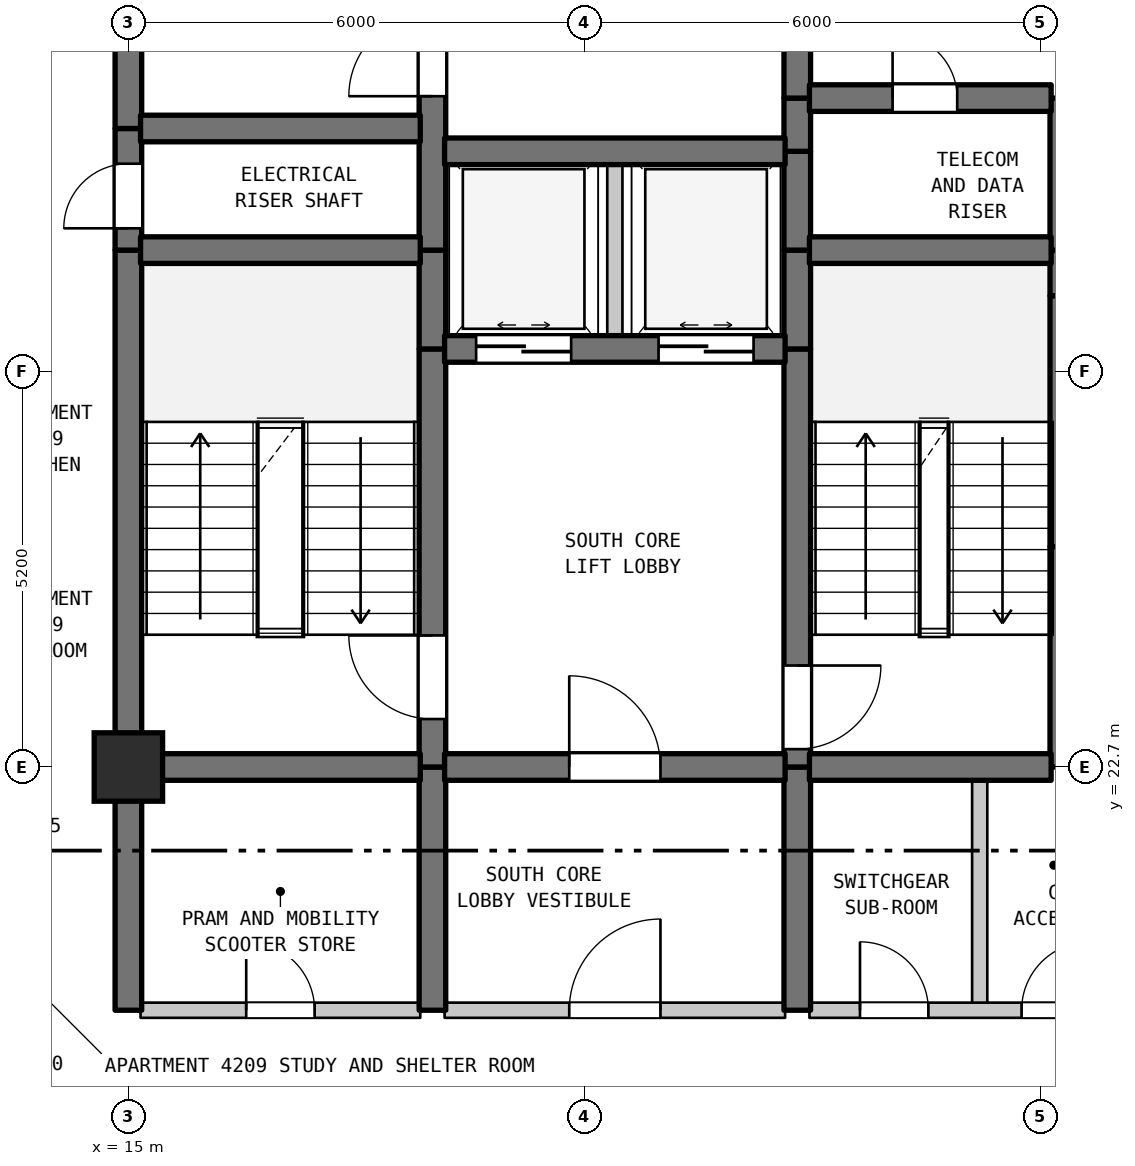
"""IFC4 building model, lengths in metres.
Left out: names, types, materials, properties, quantities, classifications, styles, units other than length and angle.
Written with IfcOpenShell. Run it as: python <this file> out.ifc"""

import sys

from ifc_helpers import new_model, si_unit, direction, frame, frame_2d, origin, origin_2d, place, context, subcontext, project, spatial, rectangle, extrude, element, fill, save


model = new_model("IFC4")
c1 = context("Model", 3, precision=1e-05, world=origin(), true_north=direction((0.0, 1.0)))
c2 = subcontext(c1, "Body", "Model", "MODEL_VIEW")
j1 = project(units=[si_unit("LENGTHUNIT", "METRE"), si_unit("PLANEANGLEUNIT", "RADIAN")], contexts=[c1])
p1 = place(None, origin())
s1 = spatial("IfcSite", under=j1, at=p1, CompositionType="ELEMENT")
p2 = place(p1, origin())
s2 = spatial("IfcBuilding", under=s1, at=p2, CompositionType="ELEMENT")
p3 = place(p2, frame((0.0, 0.0, 172.8)))
s3 = spatial("IfcBuildingStorey", under=s2, at=p3, CompositionType="ELEMENT", Elevation=172.8)
p4 = place(p3, frame((15.0, 22.7, 0.0), z_axis=(0.0, 0.0, 1.0), x_axis=(1.0, 0.0, 0.0)))
e1 = element("IfcColumn", 1, at=p4, inside=s3, PredefinedType="COLUMN", context=c2, shape_type="SweptSolid", body=[
    extrude(rectangle(XDim=0.9, YDim=0.9, at=origin_2d()), origin(), (0.0, 0.0, 1.0), 3.7),
])
p5 = place(p3, frame((15.0, 19.5, 0.0), z_axis=(0.0, 0.0, 1.0), x_axis=(0.0, 1.0, 0.0)))
e2 = element("IfcWall", 2, at=p5, inside=s3, PredefinedType="SHEAR", context=c2, shape_type="SweptSolid", body=[
    extrude(rectangle(XDim=3.2, YDim=0.35, at=frame_2d((1.6, 0.0))), origin(), (0.0, 0.0, 1.0), 3.39),
])
p6 = place(p3, frame((15.0, 22.7, 0.0), z_axis=(0.0, 0.0, 1.0), x_axis=(0.0, 1.0, 0.0)))
e3 = element("IfcWall", 3, at=p6, inside=s3, PredefinedType="SHEAR", context=c2, shape_type="SweptSolid", body=[
    extrude(rectangle(XDim=6.8, YDim=0.35, at=frame_2d((3.4, 0.0))), origin(), (0.0, 0.0, 1.0), 3.39),
])
p7 = place(p3, frame((15.0, 29.5, 0.0), z_axis=(0.0, 0.0, 1.0), x_axis=(0.0, 1.0, 0.0)))
e4 = element("IfcWall", 4, at=p7, inside=s3, PredefinedType="SHEAR", context=c2, shape_type="SweptSolid", body=[
    extrude(rectangle(XDim=1.6, YDim=0.35, at=frame_2d((0.8, 0.0))), origin(), (0.0, 0.0, 1.0), 3.39),
])
p8 = place(p7, frame((0.287, 0.0, 0.0)))
e5 = element("IfcOpeningElement", 5, at=p8, cuts=e4, PredefinedType="OPENING", context=c2, shape_type="SweptSolid", body=[
    extrude(rectangle(XDim=0.85, YDim=2.1, at=frame_2d((0.425, 1.05))), frame((0.0, 0.185, 0.0), z_axis=(0.0, -1.0, 0.0), x_axis=(1.0, 0.0, 0.0)), (0.0, 0.0, 1.0), 0.37),
])
p9 = place(p3, frame((15.0, 31.1, 0.0), z_axis=(0.0, 0.0, 1.0), x_axis=(0.0, 1.0, 0.0)))
e6 = element("IfcWall", 6, at=p9, inside=s3, PredefinedType="SHEAR", context=c2, shape_type="SweptSolid", body=[
    extrude(rectangle(XDim=6.8, YDim=0.35, at=frame_2d((3.4, 0.0))), origin(), (0.0, 0.0, 1.0), 3.39),
])
p10 = place(p3, frame((19.0, 19.5, 0.0), z_axis=(0.0, 0.0, 1.0), x_axis=(0.0, 1.0, 0.0)))
e7 = element("IfcWall", 7, at=p10, inside=s3, PredefinedType="SHEAR", context=c2, shape_type="SweptSolid", body=[
    extrude(rectangle(XDim=3.2, YDim=0.35, at=frame_2d((1.6, 0.0))), origin(), (0.0, 0.0, 1.0), 3.39),
])
p11 = place(p3, frame((19.0, 22.7, 0.0), z_axis=(0.0, 0.0, 1.0), x_axis=(0.0, 1.0, 0.0)))
e8 = element("IfcWall", 8, at=p11, inside=s3, PredefinedType="SHEAR", context=c2, shape_type="SweptSolid", body=[
    extrude(rectangle(XDim=5.5, YDim=0.35, at=frame_2d((2.75, 0.0))), origin(), (0.0, 0.0, 1.0), 3.39),
])
p12 = place(p11, frame((0.631, 0.0, 0.0)))
e9 = element("IfcOpeningElement", 9, at=p12, cuts=e8, PredefinedType="OPENING", context=c2, shape_type="SweptSolid", body=[
    extrude(rectangle(XDim=1.1, YDim=2.15, at=frame_2d((0.55, 1.075))), frame((0.0, 0.185, 0.0), z_axis=(0.0, -1.0, 0.0), x_axis=(1.0, 0.0, 0.0)), (0.0, 0.0, 1.0), 0.37),
])
p13 = place(p3, frame((19.0, 28.2, 0.0), z_axis=(0.0, 0.0, 1.0), x_axis=(0.0, 1.0, 0.0)))
e10 = element("IfcWall", 10, at=p13, inside=s3, PredefinedType="SHEAR", context=c2, shape_type="SweptSolid", body=[
    extrude(rectangle(XDim=1.3, YDim=0.35, at=frame_2d((0.65, 0.0))), origin(), (0.0, 0.0, 1.0), 3.39),
])
p14 = place(p3, frame((19.0, 29.5, 0.0), z_axis=(0.0, 0.0, 1.0), x_axis=(0.0, 1.0, 0.0)))
e11 = element("IfcWall", 11, at=p14, inside=s3, PredefinedType="SHEAR", context=c2, shape_type="SweptSolid", body=[
    extrude(rectangle(XDim=5.5, YDim=0.35, at=frame_2d((2.75, 0.0))), origin(), (0.0, 0.0, 1.0), 3.39),
])
p15 = place(p14, frame((2.025, 0.0, 0.0)))
e12 = element("IfcOpeningElement", 12, at=p15, cuts=e11, PredefinedType="OPENING", context=c2, shape_type="SweptSolid", body=[
    extrude(rectangle(XDim=1.1, YDim=2.15, at=frame_2d((0.55, 1.075))), frame((0.0, 0.185, 0.0), z_axis=(0.0, -1.0, 0.0), x_axis=(1.0, 0.0, 0.0)), (0.0, 0.0, 1.0), 0.37),
])
p16 = place(p3, frame((21.4, 28.2, 0.0), z_axis=(0.0, 0.0, 1.0), x_axis=(0.0, 1.0, 0.0)))
e13 = element("IfcWall", 13, at=p16, inside=s3, PredefinedType="STANDARD", context=c2, shape_type="SweptSolid", body=[
    extrude(rectangle(XDim=2.6, YDim=0.2, at=frame_2d((1.3, 0.0))), origin(), (0.0, 0.0, 1.0), 3.39),
])
p17 = place(p3, frame((23.8, 19.5, 0.0), z_axis=(0.0, 0.0, 1.0), x_axis=(0.0, 1.0, 0.0)))
e14 = element("IfcWall", 14, at=p17, inside=s3, PredefinedType="SHEAR", context=c2, shape_type="SweptSolid", body=[
    extrude(rectangle(XDim=3.2, YDim=0.35, at=frame_2d((1.6, 0.0))), origin(), (0.0, 0.0, 1.0), 3.39),
])
p18 = place(p3, frame((23.8, 22.7, 0.0), z_axis=(0.0, 0.0, 1.0), x_axis=(0.0, 1.0, 0.0)))
e15 = element("IfcWall", 15, at=p18, inside=s3, PredefinedType="SHEAR", context=c2, shape_type="SweptSolid", body=[
    extrude(rectangle(XDim=5.5, YDim=0.35, at=frame_2d((2.75, 0.0))), origin(), (0.0, 0.0, 1.0), 3.39),
])
p19 = place(p18, frame((0.235, 0.0, 0.0)))
e16 = element("IfcOpeningElement", 16, at=p19, cuts=e15, PredefinedType="OPENING", context=c2, shape_type="SweptSolid", body=[
    extrude(rectangle(XDim=1.1, YDim=2.15, at=frame_2d((0.55, 1.075))), frame((0.0, 0.185, 0.0), z_axis=(0.0, -1.0, 0.0), x_axis=(1.0, 0.0, 0.0)), (0.0, 0.0, 1.0), 0.37),
])
for number, where, z_axis, x_axis in (
    (17, (23.8, 28.2, 0.0), (0.0, 0.0, 1.0), (0.0, 1.0, 0.0)),
    (18, (23.8, 29.5, 0.0), (0.0, 0.0, 1.0), (0.0, 1.0, 0.0)),
):
    element("IfcWall", number, at=place(p3, frame(where, z_axis=z_axis, x_axis=x_axis)), inside=s3, PredefinedType="SHEAR", context=c2, shape_type="SweptSolid", body=[
        extrude(rectangle(XDim=1.3, YDim=0.35, at=frame_2d((0.65, 0.0))), origin(), (0.0, 0.0, 1.0), 3.39),
    ])
p20 = place(p3, frame((23.8, 30.8, 0.0), z_axis=(0.0, 0.0, 1.0), x_axis=(0.0, 1.0, 0.0)))
e19 = element("IfcWall", 19, at=p20, inside=s3, PredefinedType="SHEAR", context=c2, shape_type="SweptSolid", body=[
    extrude(rectangle(XDim=0.7, YDim=0.35, at=frame_2d((0.35, 0.0))), origin(), (0.0, 0.0, 1.0), 3.39),
])
p21 = place(p3, frame((23.8, 31.5, 0.0), z_axis=(0.0, 0.0, 1.0), x_axis=(0.0, 1.0, 0.0)))
e20 = element("IfcWall", 20, at=p21, inside=s3, PredefinedType="SHEAR", context=c2, shape_type="SweptSolid", body=[
    extrude(rectangle(XDim=3.5, YDim=0.35, at=frame_2d((1.75, 0.0))), origin(), (0.0, 0.0, 1.0), 3.39),
])
p22 = place(p21, frame((1.127, 0.0, 0.0)))
e21 = element("IfcOpeningElement", 21, at=p22, cuts=e20, PredefinedType="OPENING", context=c2, shape_type="SweptSolid", body=[
    extrude(rectangle(XDim=1.1, YDim=2.15, at=frame_2d((0.55, 1.075))), frame((0.0, 0.185, 0.0), z_axis=(0.0, -1.0, 0.0), x_axis=(1.0, 0.0, 0.0)), (0.0, 0.0, 1.0), 0.37),
])
p23 = place(p3, frame((26.2, 19.5, 0.0), z_axis=(0.0, 0.0, 1.0), x_axis=(0.0, 1.0, 0.0)))
e22 = element("IfcWall", 22, at=p23, inside=s3, PredefinedType="STANDARD", context=c2, shape_type="SweptSolid", body=[
    extrude(rectangle(XDim=3.2, YDim=0.2, at=frame_2d((1.6, 0.0))), origin(), (0.0, 0.0, 1.0), 3.39),
])
p24 = place(p3, frame((27.3, 22.7, 0.0), z_axis=(0.0, 0.0, 1.0), x_axis=(0.0, 1.0, 0.0)))
e23 = element("IfcWall", 23, at=p24, inside=s3, PredefinedType="SHEAR", context=c2, shape_type="SweptSolid", body=[
    extrude(rectangle(XDim=2.9, YDim=0.35, at=frame_2d((1.45, 0.0))), origin(), (0.0, 0.0, 1.0), 3.39),
])
p25 = place(p3, frame((27.3, 25.6, 0.0), z_axis=(0.0, 0.0, 1.0), x_axis=(0.0, 1.0, 0.0)))
e24 = element("IfcWall", 24, at=p25, inside=s3, PredefinedType="SHEAR", context=c2, shape_type="SweptSolid", body=[
    extrude(rectangle(XDim=3.3, YDim=0.35, at=frame_2d((1.65, 0.0))), origin(), (0.0, 0.0, 1.0), 3.39),
])
p26 = place(p3, frame((27.3, 28.9, 0.0), z_axis=(0.0, 0.0, 1.0), x_axis=(0.0, 1.0, 0.0)))
e25 = element("IfcWall", 25, at=p26, inside=s3, PredefinedType="SHEAR", context=c2, shape_type="SweptSolid", body=[
    extrude(rectangle(XDim=0.6, YDim=0.35, at=frame_2d((0.3, 0.0))), origin(), (0.0, 0.0, 1.0), 3.39),
])
p27 = place(p3, frame((27.3, 29.5, 0.0), z_axis=(0.0, 0.0, 1.0), x_axis=(0.0, 1.0, 0.0)))
e26 = element("IfcWall", 26, at=p27, inside=s3, PredefinedType="SHEAR", context=c2, shape_type="SweptSolid", body=[
    extrude(rectangle(XDim=2.0, YDim=0.35, at=frame_2d((1.0, 0.0))), origin(), (0.0, 0.0, 1.0), 3.39),
])
p28 = place(p3, frame((15.16, 19.5, 0.0), z_axis=(0.0, 0.0, 1.0), x_axis=(1.0, 0.0, 0.0)))
e27 = element("IfcWall", 27, at=p28, inside=s3, PredefinedType="STANDARD", context=c2, shape_type="SweptSolid", body=[
    extrude(rectangle(XDim=3.68, YDim=0.2, at=frame_2d((1.84, 0.0))), origin(), (0.0, 0.0, 1.0), 3.39),
])
p29 = place(p28, frame((1.39, 0.0, 0.0)))
e28 = element("IfcOpeningElement", 28, at=p29, cuts=e27, PredefinedType="OPENING", context=c2, shape_type="SweptSolid", body=[
    extrude(rectangle(XDim=0.9, YDim=2.15, at=frame_2d((0.45, 1.075))), frame((0.0, 0.11, 0.0), z_axis=(0.0, -1.0, 0.0), x_axis=(1.0, 0.0, 0.0)), (0.0, 0.0, 1.0), 0.22),
])
p30 = place(p3, frame((19.16, 19.5, 0.0), z_axis=(0.0, 0.0, 1.0), x_axis=(1.0, 0.0, 0.0)))
e29 = element("IfcWall", 29, at=p30, inside=s3, PredefinedType="STANDARD", context=c2, shape_type="SweptSolid", body=[
    extrude(rectangle(XDim=4.48, YDim=0.2, at=frame_2d((2.24, 0.0))), origin(), (0.0, 0.0, 1.0), 3.39),
])
p31 = place(p30, frame((1.64, 0.0, 0.0)))
e30 = element("IfcOpeningElement", 30, at=p31, cuts=e29, PredefinedType="OPENING", context=c2, shape_type="SweptSolid", body=[
    extrude(rectangle(XDim=1.2, YDim=2.2, at=frame_2d((0.6, 1.1))), frame((0.0, 0.11, 0.0), z_axis=(0.0, -1.0, 0.0), x_axis=(1.0, 0.0, 0.0)), (0.0, 0.0, 1.0), 0.22),
])
p32 = place(p3, frame((23.96, 19.5, 0.0), z_axis=(0.0, 0.0, 1.0), x_axis=(1.0, 0.0, 0.0)))
e31 = element("IfcWall", 31, at=p32, inside=s3, PredefinedType="STANDARD", context=c2, shape_type="SweptSolid", body=[
    extrude(rectangle(XDim=4.455, YDim=0.2, at=frame_2d((2.228, 0.0))), origin(), (0.0, 0.0, 1.0), 3.39),
])
p33 = place(p32, frame((0.665, 0.0, 0.0)))
e32 = element("IfcOpeningElement", 32, at=p33, cuts=e31, PredefinedType="OPENING", context=c2, shape_type="SweptSolid", body=[
    extrude(rectangle(XDim=0.9, YDim=2.15, at=frame_2d((0.45, 1.075))), frame((0.0, 0.11, 0.0), z_axis=(0.0, -1.0, 0.0), x_axis=(1.0, 0.0, 0.0)), (0.0, 0.0, 1.0), 0.22),
])
p34 = place(p32, frame((2.791, 0.0, 0.0)))
e33 = element("IfcOpeningElement", 33, at=p34, cuts=e31, PredefinedType="OPENING", context=c2, shape_type="SweptSolid", body=[
    extrude(rectangle(XDim=0.9, YDim=2.15, at=frame_2d((0.45, 1.075))), frame((0.0, 0.11, 0.0), z_axis=(0.0, -1.0, 0.0), x_axis=(1.0, 0.0, 0.0)), (0.0, 0.0, 1.0), 0.22),
])
p35 = place(p3, frame((15.16, 22.7, 0.0), z_axis=(0.0, 0.0, 1.0), x_axis=(1.0, 0.0, 0.0)))
e34 = element("IfcWall", 34, at=p35, inside=s3, PredefinedType="SHEAR", context=c2, shape_type="SweptSolid", body=[
    extrude(rectangle(XDim=3.68, YDim=0.35, at=frame_2d((1.84, 0.0))), origin(), (0.0, 0.0, 1.0), 3.39),
])
p36 = place(p3, frame((19.16, 22.7, 0.0), z_axis=(0.0, 0.0, 1.0), x_axis=(1.0, 0.0, 0.0)))
e35 = element("IfcWall", 35, at=p36, inside=s3, PredefinedType="SHEAR", context=c2, shape_type="SweptSolid", body=[
    extrude(rectangle(XDim=4.48, YDim=0.35, at=frame_2d((2.24, 0.0))), origin(), (0.0, 0.0, 1.0), 3.39),
])
p37 = place(p36, frame((1.64, 0.0, 0.0)))
e36 = element("IfcOpeningElement", 36, at=p37, cuts=e35, PredefinedType="OPENING", context=c2, shape_type="SweptSolid", body=[
    extrude(rectangle(XDim=1.2, YDim=2.2, at=frame_2d((0.6, 1.1))), frame((0.0, 0.185, 0.0), z_axis=(0.0, -1.0, 0.0), x_axis=(1.0, 0.0, 0.0)), (0.0, 0.0, 1.0), 0.37),
])
p38 = place(p3, frame((23.96, 22.7, 0.0), z_axis=(0.0, 0.0, 1.0), x_axis=(1.0, 0.0, 0.0)))
e37 = element("IfcWall", 37, at=p38, inside=s3, PredefinedType="SHEAR", context=c2, shape_type="SweptSolid", body=[
    extrude(rectangle(XDim=3.18, YDim=0.35, at=frame_2d((1.59, 0.0))), origin(), (0.0, 0.0, 1.0), 3.39),
])
p39 = place(p3, frame((19.16, 28.2, 0.0), z_axis=(0.0, 0.0, 1.0), x_axis=(1.0, 0.0, 0.0)))
e38 = element("IfcWall", 38, at=p39, inside=s3, PredefinedType="SHEAR", context=c2, shape_type="SweptSolid", body=[
    extrude(rectangle(XDim=4.48, YDim=0.35, at=frame_2d((2.24, 0.0))), origin(), (0.0, 0.0, 1.0), 3.39),
])
p40 = place(p39, frame((0.415, 0.0, 0.0)))
e39 = element("IfcOpeningElement", 39, at=p40, cuts=e38, PredefinedType="OPENING", context=c2, shape_type="SweptSolid", body=[
    extrude(rectangle(XDim=1.25, YDim=2.2, at=frame_2d((0.625, 1.1))), frame((0.0, 0.185, 0.0), z_axis=(0.0, -1.0, 0.0), x_axis=(1.0, 0.0, 0.0)), (0.0, 0.0, 1.0), 0.37),
])
p41 = place(p39, frame((2.815, 0.0, 0.0)))
e40 = element("IfcOpeningElement", 40, at=p41, cuts=e38, PredefinedType="OPENING", context=c2, shape_type="SweptSolid", body=[
    extrude(rectangle(XDim=1.25, YDim=2.2, at=frame_2d((0.625, 1.1))), frame((0.0, 0.185, 0.0), z_axis=(0.0, -1.0, 0.0), x_axis=(1.0, 0.0, 0.0)), (0.0, 0.0, 1.0), 0.37),
])
p42 = place(p3, frame((15.16, 29.5, 0.0), z_axis=(0.0, 0.0, 1.0), x_axis=(1.0, 0.0, 0.0)))
e41 = element("IfcWall", 41, at=p42, inside=s3, PredefinedType="SHEAR", context=c2, shape_type="SweptSolid", body=[
    extrude(rectangle(XDim=3.68, YDim=0.35, at=frame_2d((1.84, 0.0))), origin(), (0.0, 0.0, 1.0), 3.39),
])
p43 = place(p3, frame((23.96, 29.5, 0.0), z_axis=(0.0, 0.0, 1.0), x_axis=(1.0, 0.0, 0.0)))
e42 = element("IfcWall", 42, at=p43, inside=s3, PredefinedType="SHEAR", context=c2, shape_type="SweptSolid", body=[
    extrude(rectangle(XDim=3.18, YDim=0.35, at=frame_2d((1.59, 0.0))), origin(), (0.0, 0.0, 1.0), 3.39),
])
p44 = place(p3, frame((19.16, 30.8, 0.0), z_axis=(0.0, 0.0, 1.0), x_axis=(1.0, 0.0, 0.0)))
e43 = element("IfcWall", 43, at=p44, inside=s3, PredefinedType="SHEAR", context=c2, shape_type="SweptSolid", body=[
    extrude(rectangle(XDim=4.48, YDim=0.35, at=frame_2d((2.24, 0.0))), origin(), (0.0, 0.0, 1.0), 3.39),
])
p45 = place(p3, frame((15.16, 31.1, 0.0), z_axis=(0.0, 0.0, 1.0), x_axis=(1.0, 0.0, 0.0)))
e44 = element("IfcWall", 44, at=p45, inside=s3, PredefinedType="SHEAR", context=c2, shape_type="SweptSolid", body=[
    extrude(rectangle(XDim=3.68, YDim=0.35, at=frame_2d((1.84, 0.0))), origin(), (0.0, 0.0, 1.0), 3.39),
])
p46 = place(p3, frame((23.96, 31.5, 0.0), z_axis=(0.0, 0.0, 1.0), x_axis=(1.0, 0.0, 0.0)))
e45 = element("IfcWall", 45, at=p46, inside=s3, PredefinedType="SHEAR", context=c2, shape_type="SweptSolid", body=[
    extrude(rectangle(XDim=3.18, YDim=0.35, at=frame_2d((1.59, 0.0))), origin(), (0.0, 0.0, 1.0), 3.39),
])
p47 = place(p46, frame((1.094, 0.0, 0.0)))
e46 = element("IfcOpeningElement", 46, at=p47, cuts=e45, PredefinedType="OPENING", context=c2, shape_type="SweptSolid", body=[
    extrude(rectangle(XDim=0.85, YDim=2.1, at=frame_2d((0.425, 1.05))), frame((0.0, 0.185, 0.0), z_axis=(0.0, -1.0, 0.0), x_axis=(1.0, 0.0, 0.0)), (0.0, 0.0, 1.0), 0.37),
])
p48 = place(p8, origin())
e47 = element("IfcDoor", 47, at=p48, inside=s3, OperationType="SINGLE_SWING_LEFT", PredefinedType="DOOR", context=c2, shape_type="SweptSolid", body=[
    extrude(rectangle(XDim=0.85, YDim=2.1, at=frame_2d((0.425, 1.05))), frame((0.0, 0.025, 0.0), z_axis=(0.0, -1.0, 0.0), x_axis=(1.0, 0.0, 0.0)), (0.0, 0.0, 1.0), 0.05),
])
fill(e5, e47)
p49 = place(p12, origin())
e48 = element("IfcDoor", 48, at=p49, inside=s3, OperationType="SINGLE_SWING_RIGHT", PredefinedType="DOOR", context=c2, shape_type="SweptSolid", body=[
    extrude(rectangle(XDim=1.1, YDim=2.15, at=frame_2d((0.55, 1.075))), frame((0.0, 0.025, 0.0), z_axis=(0.0, -1.0, 0.0), x_axis=(1.0, 0.0, 0.0)), (0.0, 0.0, 1.0), 0.05),
])
fill(e9, e48)
p50 = place(p15, origin())
e49 = element("IfcDoor", 49, at=p50, inside=s3, OperationType="SINGLE_SWING_LEFT", PredefinedType="DOOR", context=c2, shape_type="SweptSolid", body=[
    extrude(rectangle(XDim=1.1, YDim=2.15, at=frame_2d((0.55, 1.075))), frame((0.0, 0.025, 0.0), z_axis=(0.0, -1.0, 0.0), x_axis=(1.0, 0.0, 0.0)), (0.0, 0.0, 1.0), 0.05),
])
fill(e12, e49)
p51 = place(p19, frame((1.1, 0.0, 0.0), z_axis=(0.0, 0.0, 1.0), x_axis=(-1.0, 0.0, 0.0)))
e50 = element("IfcDoor", 50, at=p51, inside=s3, OperationType="SINGLE_SWING_RIGHT", PredefinedType="DOOR", context=c2, shape_type="SweptSolid", body=[
    extrude(rectangle(XDim=1.1, YDim=2.15, at=frame_2d((0.55, 1.075))), frame((0.0, 0.025, 0.0), z_axis=(0.0, -1.0, 0.0), x_axis=(1.0, 0.0, 0.0)), (0.0, 0.0, 1.0), 0.05),
])
fill(e16, e50)
p52 = place(p29, origin())
e51 = element("IfcDoor", 51, at=p52, inside=s3, OperationType="SINGLE_SWING_LEFT", PredefinedType="DOOR", context=c2, shape_type="SweptSolid", body=[
    extrude(rectangle(XDim=0.9, YDim=2.15, at=frame_2d((0.45, 1.075))), frame((0.0, 0.025, 0.0), z_axis=(0.0, -1.0, 0.0), x_axis=(1.0, 0.0, 0.0)), (0.0, 0.0, 1.0), 0.05),
])
fill(e28, e51)
p53 = place(p31, origin())
e52 = element("IfcDoor", 52, at=p53, inside=s3, OperationType="SINGLE_SWING_RIGHT", PredefinedType="DOOR", context=c2, shape_type="SweptSolid", body=[
    extrude(rectangle(XDim=1.2, YDim=2.2, at=frame_2d((0.6, 1.1))), frame((0.0, 0.025, 0.0), z_axis=(0.0, -1.0, 0.0), x_axis=(1.0, 0.0, 0.0)), (0.0, 0.0, 1.0), 0.05),
])
fill(e30, e52)
p54 = place(p33, origin())
e53 = element("IfcDoor", 53, at=p54, inside=s3, OperationType="SINGLE_SWING_LEFT", PredefinedType="DOOR", context=c2, shape_type="SweptSolid", body=[
    extrude(rectangle(XDim=0.9, YDim=2.15, at=frame_2d((0.45, 1.075))), frame((0.0, 0.025, 0.0), z_axis=(0.0, -1.0, 0.0), x_axis=(1.0, 0.0, 0.0)), (0.0, 0.0, 1.0), 0.05),
])
fill(e32, e53)
p55 = place(p34, origin())
e54 = element("IfcDoor", 54, at=p55, inside=s3, OperationType="SINGLE_SWING_RIGHT", PredefinedType="DOOR", context=c2, shape_type="SweptSolid", body=[
    extrude(rectangle(XDim=0.9, YDim=2.15, at=frame_2d((0.45, 1.075))), frame((0.0, 0.025, 0.0), z_axis=(0.0, -1.0, 0.0), x_axis=(1.0, 0.0, 0.0)), (0.0, 0.0, 1.0), 0.05),
])
fill(e33, e54)
p56 = place(p37, origin())
e55 = element("IfcDoor", 55, at=p56, inside=s3, OperationType="SINGLE_SWING_LEFT", PredefinedType="DOOR", context=c2, shape_type="SweptSolid", body=[
    extrude(rectangle(XDim=1.2, YDim=2.2, at=frame_2d((0.6, 1.1))), frame((0.0, 0.025, 0.0), z_axis=(0.0, -1.0, 0.0), x_axis=(1.0, 0.0, 0.0)), (0.0, 0.0, 1.0), 0.05),
])
fill(e36, e55)
p57 = place(p40, origin())
e56 = element("IfcDoor", 56, at=p57, inside=s3, OperationType="DOUBLE_DOOR_SLIDING", PredefinedType="DOOR", context=c2, shape_type="SweptSolid", body=[
    extrude(rectangle(XDim=1.25, YDim=2.2, at=frame_2d((0.625, 1.1))), frame((0.0, 0.025, 0.0), z_axis=(0.0, -1.0, 0.0), x_axis=(1.0, 0.0, 0.0)), (0.0, 0.0, 1.0), 0.05),
])
fill(e39, e56)
p58 = place(p41, origin())
e57 = element("IfcDoor", 57, at=p58, inside=s3, OperationType="DOUBLE_DOOR_SLIDING", PredefinedType="DOOR", context=c2, shape_type="SweptSolid", body=[
    extrude(rectangle(XDim=1.25, YDim=2.2, at=frame_2d((0.625, 1.1))), frame((0.0, 0.025, 0.0), z_axis=(0.0, -1.0, 0.0), x_axis=(1.0, 0.0, 0.0)), (0.0, 0.0, 1.0), 0.05),
])
fill(e40, e57)
p59 = place(p47, origin())
e58 = element("IfcDoor", 58, at=p59, inside=s3, OperationType="SINGLE_SWING_LEFT", PredefinedType="DOOR", context=c2, shape_type="SweptSolid", body=[
    extrude(rectangle(XDim=0.85, YDim=2.1, at=frame_2d((0.425, 1.05))), frame((0.0, 0.025, 0.0), z_axis=(0.0, -1.0, 0.0), x_axis=(1.0, 0.0, 0.0)), (0.0, 0.0, 1.0), 0.05),
])
fill(e46, e58)
save(model, sys.argv[1])
